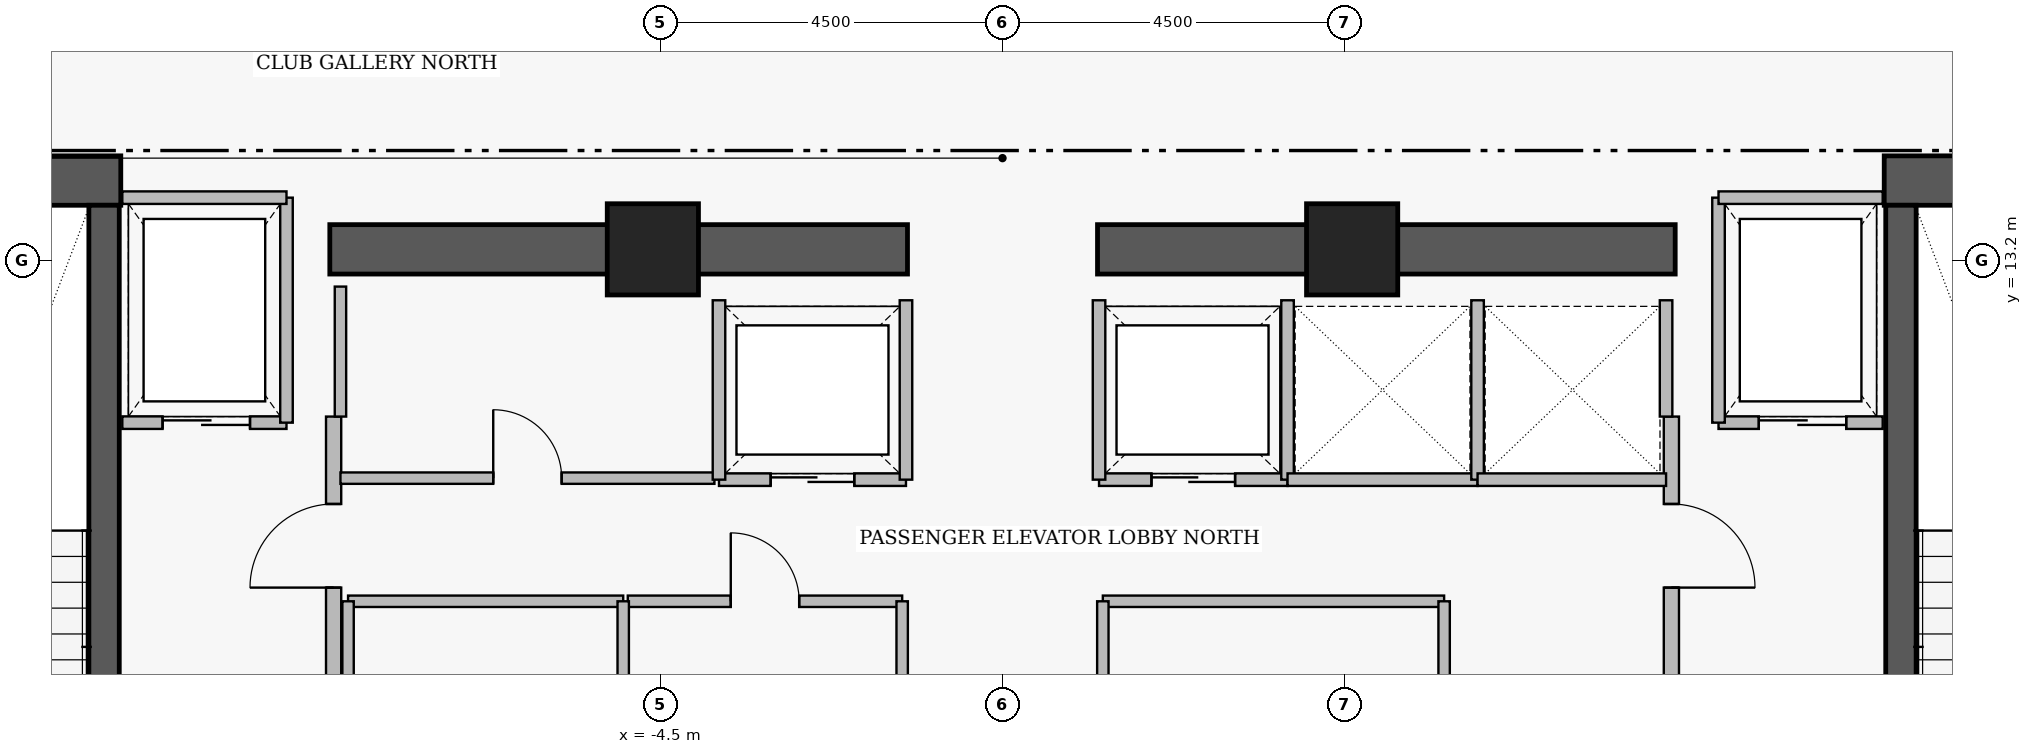
"""IFC4 building model, lengths in metres.
Left out: names, types, materials, properties, quantities, classifications, styles, units other than length and angle.
Written with IfcOpenShell. Run it as: python <this file> out.ifc"""

import sys

from ifc_helpers import new_model, si_unit, direction, frame, frame_2d, origin, origin_2d, place, context, subcontext, project, spatial, rectangle, extrude, element, fill, save


model = new_model("IFC4")
c1 = context("Model", 3, precision=1e-05, world=origin(), true_north=direction((0.0, 1.0)))
c2 = subcontext(c1, "Body", "Model", "MODEL_VIEW")
j1 = project(units=[si_unit("LENGTHUNIT", "METRE"), si_unit("PLANEANGLEUNIT", "RADIAN")], contexts=[c1])
p1 = place(None, origin())
s1 = spatial("IfcSite", under=j1, at=p1, CompositionType="ELEMENT")
p2 = place(p1, origin())
s2 = spatial("IfcBuilding", under=s1, at=p2, CompositionType="ELEMENT")
p3 = place(p2, frame((0.0, 0.0, 188.65)))
s3 = spatial("IfcBuildingStorey", under=s2, at=p3, CompositionType="ELEMENT", Elevation=188.65)
for number, where, z_axis, x_axis in (
    (1, (-16.06, 14.255, 0.0), (0.0, 0.0, 1.0), (1.0, 0.0, 0.0)),
    (2, (11.6, 14.255, 0.0), (0.0, 0.0, 1.0), (1.0, 0.0, 0.0)),
):
    element("IfcWall", number, at=place(p3, frame(where, z_axis=z_axis, x_axis=x_axis)), inside=s3, PredefinedType="SHEAR", context=c2, shape_type="SweptSolid", body=[
        extrude(rectangle(XDim=4.46, YDim=0.65, at=frame_2d((2.23, 0.0))), origin(), (0.0, 0.0, 1.0), 3.56),
    ])
for number, where, z_axis, x_axis in (
    (3, (-8.85, 13.35, 0.0), (0.0, 0.0, 1.0), (1.0, 0.0, 0.0)),
    (4, (1.25, 13.35, 0.0), (0.0, 0.0, 1.0), (1.0, 0.0, 0.0)),
):
    element("IfcWall", number, at=place(p3, frame(where, z_axis=z_axis, x_axis=x_axis)), inside=s3, PredefinedType="SHEAR", context=c2, shape_type="SweptSolid", body=[
        extrude(rectangle(XDim=7.6, YDim=0.65, at=frame_2d((3.8, 0.0))), origin(), (0.0, 0.0, 1.0), 3.53),
    ])
p4 = place(p3, frame((-11.82, 4.97, 0.0), z_axis=(0.0, 0.0, 1.0), x_axis=(0.0, 1.0, 0.0)))
e5 = element("IfcWall", 5, at=p4, inside=s3, PredefinedType="SHEAR", context=c2, shape_type="SweptSolid", body=[
    extrude(rectangle(XDim=8.96, YDim=0.4, at=frame_2d((4.48, 0.0))), origin(), (0.0, 0.0, 1.0), 3.56),
])
p5 = place(p4, frame((0.31, 0.0, 0.0)))
e6 = element("IfcOpeningElement", 6, at=p5, cuts=e5, PredefinedType="OPENING", context=c2, shape_type="SweptSolid", body=[
    extrude(rectangle(XDim=1.12, YDim=2.22, at=frame_2d((0.56, 1.11))), frame((0.0, 0.21, 0.0), z_axis=(0.0, -1.0, 0.0), x_axis=(1.0, 0.0, 0.0)), (0.0, 0.0, 1.0), 0.42),
])
p6 = place(p3, frame((11.82, 13.93, 0.0), z_axis=(0.0, 0.0, 1.0), x_axis=(0.0, -1.0, 0.0)))
e7 = element("IfcWall", 7, at=p6, inside=s3, PredefinedType="SHEAR", context=c2, shape_type="SweptSolid", body=[
    extrude(rectangle(XDim=8.96, YDim=0.4, at=frame_2d((4.48, 0.0))), origin(), (0.0, 0.0, 1.0), 3.56),
])
p7 = place(p6, frame((7.53, 0.0, 0.0)))
e8 = element("IfcOpeningElement", 8, at=p7, cuts=e7, PredefinedType="OPENING", context=c2, shape_type="SweptSolid", body=[
    extrude(rectangle(XDim=1.12, YDim=2.22, at=frame_2d((0.56, 1.11))), frame((0.0, 0.21, 0.0), z_axis=(0.0, -1.0, 0.0), x_axis=(1.0, 0.0, 0.0)), (0.0, 0.0, 1.0), 0.42),
])
for number, where, z_axis, x_axis in (
    (9, (-4.6, 13.35, 0.0), (0.0, 0.0, 1.0), (1.0, 0.0, 0.0)),
    (10, (4.6, 13.35, 0.0), (0.0, 0.0, 1.0), (1.0, 0.0, 0.0)),
):
    element("IfcColumn", number, at=place(p3, frame(where, z_axis=z_axis, x_axis=x_axis)), inside=s3, PredefinedType="COLUMN", context=c2, shape_type="SweptSolid", body=[
        extrude(rectangle(XDim=1.2, YDim=1.2, at=origin_2d()), origin(), (0.0, 0.0, 1.0), 3.75),
    ])
p8 = place(p3, frame((-8.8, 5.05, 0.0), z_axis=(0.0, 0.0, 1.0), x_axis=(0.0, 1.0, 0.0)))
e11 = element("IfcWall", 11, at=p8, inside=s3, PredefinedType="PARTITIONING", context=c2, shape_type="SweptSolid", body=[
    extrude(rectangle(XDim=6.1, YDim=0.2, at=frame_2d((3.05, 0.0))), origin(), (0.0, 0.0, 1.0), 3.53),
])
p9 = place(p8, frame((0.25, 0.0, 0.0)))
e12 = element("IfcOpeningElement", 12, at=p9, cuts=e11, PredefinedType="OPENING", context=c2, shape_type="SweptSolid", body=[
    extrude(rectangle(XDim=1.1, YDim=2.2, at=frame_2d((0.55, 1.1))), frame((0.0, 0.11, 0.0), z_axis=(0.0, -1.0, 0.0), x_axis=(1.0, 0.0, 0.0)), (0.0, 0.0, 1.0), 0.22),
])
p10 = place(p8, frame((3.85, 0.0, 0.0)))
e13 = element("IfcOpeningElement", 13, at=p10, cuts=e11, PredefinedType="OPENING", context=c2, shape_type="SweptSolid", body=[
    extrude(rectangle(XDim=1.1, YDim=2.2, at=frame_2d((0.55, 1.1))), frame((0.0, 0.11, 0.0), z_axis=(0.0, -1.0, 0.0), x_axis=(1.0, 0.0, 0.0)), (0.0, 0.0, 1.0), 0.22),
])
p11 = place(p3, frame((8.8, 11.15, 0.0), z_axis=(0.0, 0.0, 1.0), x_axis=(0.0, -1.0, 0.0)))
e14 = element("IfcWall", 14, at=p11, inside=s3, PredefinedType="PARTITIONING", context=c2, shape_type="SweptSolid", body=[
    extrude(rectangle(XDim=6.1, YDim=0.2, at=frame_2d((3.05, 0.0))), origin(), (0.0, 0.0, 1.0), 3.53),
])
p12 = place(p11, frame((1.15, 0.0, 0.0)))
e15 = element("IfcOpeningElement", 15, at=p12, cuts=e14, PredefinedType="OPENING", context=c2, shape_type="SweptSolid", body=[
    extrude(rectangle(XDim=1.1, YDim=2.2, at=frame_2d((0.55, 1.1))), frame((0.0, 0.11, 0.0), z_axis=(0.0, -1.0, 0.0), x_axis=(1.0, 0.0, 0.0)), (0.0, 0.0, 1.0), 0.22),
])
p13 = place(p11, frame((4.75, 0.0, 0.0)))
e16 = element("IfcOpeningElement", 16, at=p13, cuts=e14, PredefinedType="OPENING", context=c2, shape_type="SweptSolid", body=[
    extrude(rectangle(XDim=1.1, YDim=2.2, at=frame_2d((0.55, 1.1))), frame((0.0, 0.11, 0.0), z_axis=(0.0, -1.0, 0.0), x_axis=(1.0, 0.0, 0.0)), (0.0, 0.0, 1.0), 0.22),
])
p14 = place(p3, frame((-11.58, 11.07, 0.0), z_axis=(0.0, 0.0, 1.0), x_axis=(1.0, 0.0, 0.0)))
e17 = element("IfcWall", 17, at=p14, inside=s3, PredefinedType="PARTITIONING", context=c2, shape_type="SweptSolid", body=[
    extrude(rectangle(XDim=2.16, YDim=0.165, at=frame_2d((1.08, 0.0))), origin(), (0.0, 0.0, 1.0), 3.53),
])
p15 = place(p14, frame((0.53, 0.0, 0.0)))
e18 = element("IfcOpeningElement", 18, at=p15, cuts=e17, PredefinedType="OPENING", context=c2, shape_type="SweptSolid", body=[
    extrude(rectangle(XDim=1.15, YDim=2.25, at=frame_2d((0.575, 1.125))), frame((0.0, 0.093, 0.0), z_axis=(0.0, -1.0, 0.0), x_axis=(1.0, 0.0, 0.0)), (0.0, 0.0, 1.0), 0.185),
])
p16 = place(p3, frame((9.42, 11.07, 0.0), z_axis=(0.0, 0.0, 1.0), x_axis=(1.0, 0.0, 0.0)))
e19 = element("IfcWall", 19, at=p16, inside=s3, PredefinedType="PARTITIONING", context=c2, shape_type="SweptSolid", body=[
    extrude(rectangle(XDim=2.16, YDim=0.165, at=frame_2d((1.08, 0.0))), origin(), (0.0, 0.0, 1.0), 3.53),
])
p17 = place(p16, frame((0.53, 0.0, 0.0)))
e20 = element("IfcOpeningElement", 20, at=p17, cuts=e19, PredefinedType="OPENING", context=c2, shape_type="SweptSolid", body=[
    extrude(rectangle(XDim=1.15, YDim=2.25, at=frame_2d((0.575, 1.125))), frame((0.0, 0.093, 0.0), z_axis=(0.0, -1.0, 0.0), x_axis=(1.0, 0.0, 0.0)), (0.0, 0.0, 1.0), 0.185),
])
p18 = place(p3, frame((-3.73, 10.32, 0.0), z_axis=(0.0, 0.0, 1.0), x_axis=(1.0, 0.0, 0.0)))
e21 = element("IfcWall", 21, at=p18, inside=s3, PredefinedType="PARTITIONING", context=c2, shape_type="SweptSolid", body=[
    extrude(rectangle(XDim=2.46, YDim=0.165, at=frame_2d((1.23, 0.0))), origin(), (0.0, 0.0, 1.0), 3.53),
])
p19 = place(p18, frame((0.68, 0.0, 0.0)))
e22 = element("IfcOpeningElement", 22, at=p19, cuts=e21, PredefinedType="OPENING", context=c2, shape_type="SweptSolid", body=[
    extrude(rectangle(XDim=1.1, YDim=2.25, at=frame_2d((0.55, 1.125))), frame((0.0, 0.093, 0.0), z_axis=(0.0, -1.0, 0.0), x_axis=(1.0, 0.0, 0.0)), (0.0, 0.0, 1.0), 0.185),
])
p20 = place(p3, frame((1.27, 10.32, 0.0), z_axis=(0.0, 0.0, 1.0), x_axis=(1.0, 0.0, 0.0)))
e23 = element("IfcWall", 23, at=p20, inside=s3, PredefinedType="PARTITIONING", context=c2, shape_type="SweptSolid", body=[
    extrude(rectangle(XDim=2.48, YDim=0.165, at=frame_2d((1.24, 0.0))), origin(), (0.0, 0.0, 1.0), 3.53),
])
p21 = place(p20, frame((0.69, 0.0, 0.0)))
e24 = element("IfcOpeningElement", 24, at=p21, cuts=e23, PredefinedType="OPENING", context=c2, shape_type="SweptSolid", body=[
    extrude(rectangle(XDim=1.1, YDim=2.25, at=frame_2d((0.55, 1.125))), frame((0.0, 0.093, 0.0), z_axis=(0.0, -1.0, 0.0), x_axis=(1.0, 0.0, 0.0)), (0.0, 0.0, 1.0), 0.185),
])
p22 = place(p3, frame((-8.71, 10.34, 0.0), z_axis=(0.0, 0.0, 1.0), x_axis=(1.0, 0.0, 0.0)))
e25 = element("IfcWall", 25, at=p22, inside=s3, PredefinedType="PARTITIONING", context=c2, shape_type="SweptSolid", body=[
    extrude(rectangle(XDim=4.92, YDim=0.15, at=frame_2d((2.46, 0.0))), origin(), (0.0, 0.0, 1.0), 3.53),
])
p23 = place(p22, frame((2.01, 0.0, 0.0)))
e26 = element("IfcOpeningElement", 26, at=p23, cuts=e25, PredefinedType="OPENING", context=c2, shape_type="SweptSolid", body=[
    extrude(rectangle(XDim=0.9, YDim=2.15, at=frame_2d((0.45, 1.075))), frame((0.0, 0.085, 0.0), z_axis=(0.0, -1.0, 0.0), x_axis=(1.0, 0.0, 0.0)), (0.0, 0.0, 1.0), 0.17),
])
p24 = place(p3, frame((-4.93, 8.72, 0.0), z_axis=(0.0, 0.0, 1.0), x_axis=(1.0, 0.0, 0.0)))
e27 = element("IfcWall", 27, at=p24, inside=s3, PredefinedType="PARTITIONING", context=c2, shape_type="SweptSolid", body=[
    extrude(rectangle(XDim=3.61, YDim=0.15, at=frame_2d((1.805, 0.0))), origin(), (0.0, 0.0, 1.0), 3.53),
])
p25 = place(p24, frame((1.355, 0.0, 0.0)))
e28 = element("IfcOpeningElement", 28, at=p25, cuts=e27, PredefinedType="OPENING", context=c2, shape_type="SweptSolid", body=[
    extrude(rectangle(XDim=0.9, YDim=2.15, at=frame_2d((0.45, 1.075))), frame((0.0, 0.085, 0.0), z_axis=(0.0, -1.0, 0.0), x_axis=(1.0, 0.0, 0.0)), (0.0, 0.0, 1.0), 0.17),
])
p26 = place(p3, frame((-9.42, 11.07, 0.0), z_axis=(0.0, 0.0, 1.0), x_axis=(0.0, 1.0, 0.0)))
e29 = element("IfcWall", 29, at=p26, inside=s3, PredefinedType="PARTITIONING", context=c2, shape_type="SweptSolid", body=[
    extrude(rectangle(XDim=2.96, YDim=0.165, at=frame_2d((1.48, 0.0))), origin(), (0.0, 0.0, 1.0), 3.53),
])
p27 = place(p3, frame((-11.58, 14.03, 0.0), z_axis=(0.0, 0.0, 1.0), x_axis=(1.0, 0.0, 0.0)))
e30 = element("IfcWall", 30, at=p27, inside=s3, PredefinedType="PARTITIONING", context=c2, shape_type="SweptSolid", body=[
    extrude(rectangle(XDim=2.16, YDim=0.165, at=frame_2d((1.08, 0.0))), origin(), (0.0, 0.0, 1.0), 3.53),
])
p28 = place(p3, frame((9.42, 11.07, 0.0), z_axis=(0.0, 0.0, 1.0), x_axis=(0.0, 1.0, 0.0)))
e31 = element("IfcWall", 31, at=p28, inside=s3, PredefinedType="PARTITIONING", context=c2, shape_type="SweptSolid", body=[
    extrude(rectangle(XDim=2.96, YDim=0.165, at=frame_2d((1.48, 0.0))), origin(), (0.0, 0.0, 1.0), 3.53),
])
p29 = place(p3, frame((9.42, 14.03, 0.0), z_axis=(0.0, 0.0, 1.0), x_axis=(1.0, 0.0, 0.0)))
e32 = element("IfcWall", 32, at=p29, inside=s3, PredefinedType="PARTITIONING", context=c2, shape_type="SweptSolid", body=[
    extrude(rectangle(XDim=2.16, YDim=0.165, at=frame_2d((1.08, 0.0))), origin(), (0.0, 0.0, 1.0), 3.53),
])
for number, where, z_axis, x_axis in (
    (33, (-3.73, 10.32, 0.0), (0.0, 0.0, 1.0), (0.0, 1.0, 0.0)),
    (34, (-1.27, 10.32, 0.0), (0.0, 0.0, 1.0), (0.0, 1.0, 0.0)),
    (35, (1.27, 10.32, 0.0), (0.0, 0.0, 1.0), (0.0, 1.0, 0.0)),
    (36, (3.75, 10.32, 0.0), (0.0, 0.0, 1.0), (0.0, 1.0, 0.0)),
):
    element("IfcWall", number, at=place(p3, frame(where, z_axis=z_axis, x_axis=x_axis)), inside=s3, PredefinedType="PARTITIONING", context=c2, shape_type="SweptSolid", body=[
        extrude(rectangle(XDim=2.36, YDim=0.165, at=frame_2d((1.18, 0.0))), origin(), (0.0, 0.0, 1.0), 3.53),
    ])
p30 = place(p3, frame((3.75, 10.32, 0.0), z_axis=(0.0, 0.0, 1.0), x_axis=(1.0, 0.0, 0.0)))
e37 = element("IfcWall", 37, at=p30, inside=s3, PredefinedType="PARTITIONING", context=c2, shape_type="SweptSolid", body=[
    extrude(rectangle(XDim=2.5, YDim=0.165, at=frame_2d((1.25, 0.0))), origin(), (0.0, 0.0, 1.0), 3.53),
])
p31 = place(p3, frame((6.25, 10.32, 0.0), z_axis=(0.0, 0.0, 1.0), x_axis=(0.0, 1.0, 0.0)))
e38 = element("IfcWall", 38, at=p31, inside=s3, PredefinedType="PARTITIONING", context=c2, shape_type="SweptSolid", body=[
    extrude(rectangle(XDim=2.36, YDim=0.165, at=frame_2d((1.18, 0.0))), origin(), (0.0, 0.0, 1.0), 3.53),
])
p32 = place(p3, frame((6.25, 10.32, 0.0), z_axis=(0.0, 0.0, 1.0), x_axis=(1.0, 0.0, 0.0)))
e39 = element("IfcWall", 39, at=p32, inside=s3, PredefinedType="PARTITIONING", context=c2, shape_type="SweptSolid", body=[
    extrude(rectangle(XDim=2.48, YDim=0.165, at=frame_2d((1.24, 0.0))), origin(), (0.0, 0.0, 1.0), 3.53),
])
p33 = place(p3, frame((8.73, 11.15, 0.0), z_axis=(0.0, 0.0, 1.0), x_axis=(0.0, 1.0, 0.0)))
e40 = element("IfcWall", 40, at=p33, inside=s3, PredefinedType="PARTITIONING", context=c2, shape_type="SweptSolid", body=[
    extrude(rectangle(XDim=1.53, YDim=0.165, at=frame_2d((0.765, 0.0))), origin(), (0.0, 0.0, 1.0), 3.53),
])
p34 = place(p3, frame((-8.71, 11.15, 0.0), z_axis=(0.0, 0.0, 1.0), x_axis=(0.0, 1.0, 0.0)))
e41 = element("IfcWall", 41, at=p34, inside=s3, PredefinedType="PARTITIONING", context=c2, shape_type="SweptSolid", body=[
    extrude(rectangle(XDim=1.71, YDim=0.15, at=frame_2d((0.855, 0.0))), origin(), (0.0, 0.0, 1.0), 3.53),
])
p35 = place(p3, frame((-8.61, 8.72, 0.0), z_axis=(0.0, 0.0, 1.0), x_axis=(1.0, 0.0, 0.0)))
e42 = element("IfcWall", 42, at=p35, inside=s3, PredefinedType="PARTITIONING", context=c2, shape_type="SweptSolid", body=[
    extrude(rectangle(XDim=3.62, YDim=0.15, at=frame_2d((1.81, 0.0))), origin(), (0.0, 0.0, 1.0), 3.53),
])
for number, where, z_axis, x_axis in (
    (43, (-8.61, 6.48, 0.0), (0.0, 0.0, 1.0), (0.0, 1.0, 0.0)),
    (44, (-4.99, 6.48, 0.0), (0.0, 0.0, 1.0), (0.0, 1.0, 0.0)),
    (45, (-1.32, 6.48, 0.0), (0.0, 0.0, 1.0), (0.0, 1.0, 0.0)),
):
    element("IfcWall", number, at=place(p3, frame(where, z_axis=z_axis, x_axis=x_axis)), inside=s3, PredefinedType="PARTITIONING", context=c2, shape_type="SweptSolid", body=[
        extrude(rectangle(XDim=2.24, YDim=0.15, at=frame_2d((1.12, 0.0))), origin(), (0.0, 0.0, 1.0), 3.53),
    ])
p36 = place(p3, frame((1.32, 8.72, 0.0), z_axis=(0.0, 0.0, 1.0), x_axis=(1.0, 0.0, 0.0)))
e46 = element("IfcWall", 46, at=p36, inside=s3, PredefinedType="PARTITIONING", context=c2, shape_type="SweptSolid", body=[
    extrude(rectangle(XDim=4.49, YDim=0.15, at=frame_2d((2.245, 0.0))), origin(), (0.0, 0.0, 1.0), 3.53),
])
for number, where, z_axis, x_axis in (
    (47, (1.32, 6.48, 0.0), (0.0, 0.0, 1.0), (0.0, 1.0, 0.0)),
    (48, (5.81, 6.48, 0.0), (0.0, 0.0, 1.0), (0.0, 1.0, 0.0)),
):
    element("IfcWall", number, at=place(p3, frame(where, z_axis=z_axis, x_axis=x_axis)), inside=s3, PredefinedType="PARTITIONING", context=c2, shape_type="SweptSolid", body=[
        extrude(rectangle(XDim=2.24, YDim=0.15, at=frame_2d((1.12, 0.0))), origin(), (0.0, 0.0, 1.0), 3.53),
    ])
p37 = place(p10, origin())
e49 = element("IfcDoor", 49, at=p37, inside=s3, OperationType="SINGLE_SWING_LEFT", PredefinedType="DOOR", context=c2, shape_type="SweptSolid", body=[
    extrude(rectangle(XDim=1.1, YDim=2.2, at=frame_2d((0.55, 1.1))), frame((0.0, 0.025, 0.0), z_axis=(0.0, -1.0, 0.0), x_axis=(1.0, 0.0, 0.0)), (0.0, 0.0, 1.0), 0.05),
])
fill(e13, e49)
p38 = place(p12, origin())
e50 = element("IfcDoor", 50, at=p38, inside=s3, OperationType="SINGLE_SWING_RIGHT", PredefinedType="DOOR", context=c2, shape_type="SweptSolid", body=[
    extrude(rectangle(XDim=1.1, YDim=2.2, at=frame_2d((0.55, 1.1))), frame((0.0, 0.025, 0.0), z_axis=(0.0, -1.0, 0.0), x_axis=(1.0, 0.0, 0.0)), (0.0, 0.0, 1.0), 0.05),
])
fill(e15, e50)
p39 = place(p15, origin())
e51 = element("IfcDoor", 51, at=p39, inside=s3, OperationType="SLIDING_TO_LEFT", PredefinedType="DOOR", context=c2, shape_type="SweptSolid", body=[
    extrude(rectangle(XDim=1.15, YDim=2.25, at=frame_2d((0.575, 1.125))), frame((0.0, 0.025, 0.0), z_axis=(0.0, -1.0, 0.0), x_axis=(1.0, 0.0, 0.0)), (0.0, 0.0, 1.0), 0.05),
])
fill(e18, e51)
p40 = place(p17, origin())
e52 = element("IfcDoor", 52, at=p40, inside=s3, OperationType="SLIDING_TO_LEFT", PredefinedType="DOOR", context=c2, shape_type="SweptSolid", body=[
    extrude(rectangle(XDim=1.15, YDim=2.25, at=frame_2d((0.575, 1.125))), frame((0.0, 0.025, 0.0), z_axis=(0.0, -1.0, 0.0), x_axis=(1.0, 0.0, 0.0)), (0.0, 0.0, 1.0), 0.05),
])
fill(e20, e52)
p41 = place(p19, origin())
e53 = element("IfcDoor", 53, at=p41, inside=s3, OperationType="SLIDING_TO_LEFT", PredefinedType="DOOR", context=c2, shape_type="SweptSolid", body=[
    extrude(rectangle(XDim=1.1, YDim=2.25, at=frame_2d((0.55, 1.125))), frame((0.0, 0.025, 0.0), z_axis=(0.0, -1.0, 0.0), x_axis=(1.0, 0.0, 0.0)), (0.0, 0.0, 1.0), 0.05),
])
fill(e22, e53)
p42 = place(p21, origin())
e54 = element("IfcDoor", 54, at=p42, inside=s3, OperationType="SLIDING_TO_LEFT", PredefinedType="DOOR", context=c2, shape_type="SweptSolid", body=[
    extrude(rectangle(XDim=1.1, YDim=2.25, at=frame_2d((0.55, 1.125))), frame((0.0, 0.025, 0.0), z_axis=(0.0, -1.0, 0.0), x_axis=(1.0, 0.0, 0.0)), (0.0, 0.0, 1.0), 0.05),
])
fill(e24, e54)
p43 = place(p23, origin())
e55 = element("IfcDoor", 55, at=p43, inside=s3, OperationType="SINGLE_SWING_LEFT", PredefinedType="DOOR", context=c2, shape_type="SweptSolid", body=[
    extrude(rectangle(XDim=0.9, YDim=2.15, at=frame_2d((0.45, 1.075))), frame((0.0, 0.025, 0.0), z_axis=(0.0, -1.0, 0.0), x_axis=(1.0, 0.0, 0.0)), (0.0, 0.0, 1.0), 0.05),
])
fill(e26, e55)
p44 = place(p25, origin())
e56 = element("IfcDoor", 56, at=p44, inside=s3, OperationType="SINGLE_SWING_LEFT", PredefinedType="DOOR", context=c2, shape_type="SweptSolid", body=[
    extrude(rectangle(XDim=0.9, YDim=2.15, at=frame_2d((0.45, 1.075))), frame((0.0, 0.025, 0.0), z_axis=(0.0, -1.0, 0.0), x_axis=(1.0, 0.0, 0.0)), (0.0, 0.0, 1.0), 0.05),
])
fill(e28, e56)
save(model, sys.argv[1])
